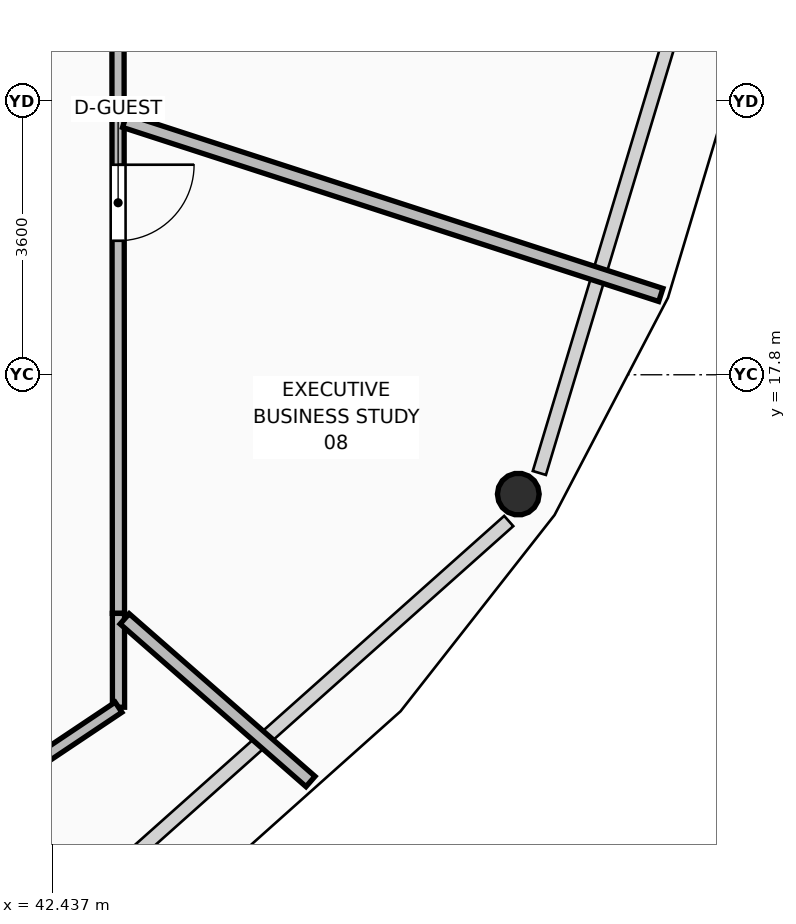
"""IFC4 building model, lengths in metres.
Left out: names, types, materials, properties, quantities, classifications, styles, units other than length and angle.
Written with IfcOpenShell. Run it as: python <this file> out.ifc"""

import sys

from ifc_helpers import new_model, si_unit, direction, frame, frame_2d, origin, origin_2d, place, context, subcontext, project, spatial, rectangle, hollow_circle, extrude, element, fill, save


model = new_model("IFC4")
c1 = context("Model", 3, precision=1e-05, world=origin(), true_north=direction((0.0, 1.0)))
c2 = subcontext(c1, "Body", "Model", "MODEL_VIEW")
j1 = project(units=[si_unit("LENGTHUNIT", "METRE"), si_unit("PLANEANGLEUNIT", "RADIAN")], contexts=[c1])
p1 = place(None, origin())
s1 = spatial("IfcSite", under=j1, at=p1, CompositionType="ELEMENT")
p2 = place(p1, origin())
s2 = spatial("IfcBuilding", under=s1, at=p2, CompositionType="ELEMENT")
p3 = place(p2, frame((0.0, 0.0, 271.35)))
s3 = spatial("IfcBuildingStorey", under=s2, at=p3, CompositionType="ELEMENT", Elevation=271.35)
p4 = place(p3, frame((48.569, 16.23, 0.0), z_axis=(-0.019349782702, 0.010119320989, 0.9997615642), x_axis=(-0.463421877407, -0.886137779096, 0.0)))
e1 = element("IfcColumn", 1, at=p4, inside=s3, PredefinedType="COLUMN", context=c2, shape_type="SweptSolid", body=[
    extrude(hollow_circle(Radius=0.275, WallThickness=0.025, at=origin_2d()), origin(), (0.0, 0.0, 1.0), 3.571),
])
p5 = place(p3, frame((43.299, 26.886, 0.0), z_axis=(0.0, 0.0, 1.0), x_axis=(0.000683147443, -0.999999766655, 0.0)))
e2 = element("IfcWall", 2, at=p5, inside=s3, PredefinedType="PARTITIONING", context=c2, shape_type="SweptSolid", body=[
    extrude(rectangle(XDim=5.718, YDim=0.16, at=frame_2d((2.859, 0.0))), origin(), (0.0, 0.0, 1.0), 3.132),
])
p6 = place(p5, frame((2.259, 0.0, 0.0)))
e3 = element("IfcOpeningElement", 3, at=p6, cuts=e2, PredefinedType="OPENING", context=c2, shape_type="SweptSolid", body=[
    extrude(rectangle(XDim=1.2, YDim=2.1, at=frame_2d((0.6, 1.05))), frame((0.0, 0.09, 0.0), z_axis=(0.0, -1.0, 0.0), x_axis=(1.0, 0.0, 0.0)), (0.0, 0.0, 1.0), 0.18),
])
p7 = place(p3, frame((43.303, 21.168, 0.0), z_axis=(0.0, 0.0, 1.0), x_axis=(0.000787903556, -0.999999689604, 0.0)))
e4 = element("IfcWall", 4, at=p7, inside=s3, PredefinedType="PARTITIONING", context=c2, shape_type="SweptSolid", body=[
    extrude(rectangle(XDim=6.507, YDim=0.16, at=frame_2d((3.253, 0.0))), origin(), (0.0, 0.0, 1.0), 3.132),
])
p8 = place(p7, frame((0.605, 0.0, 0.0)))
e5 = element("IfcOpeningElement", 5, at=p8, cuts=e4, PredefinedType="OPENING", context=c2, shape_type="SweptSolid", body=[
    extrude(rectangle(XDim=1.0, YDim=2.1, at=frame_2d((0.5, 1.05))), frame((0.0, 0.09, 0.0), z_axis=(0.0, -1.0, 0.0), x_axis=(1.0, 0.0, 0.0)), (0.0, 0.0, 1.0), 0.18),
])
p9 = place(p3, frame((43.308, 14.661, 0.0), z_axis=(0.0, 0.0, 1.0), x_axis=(0.000790826166, -0.999999687297, 0.0)))
e6 = element("IfcWall", 6, at=p9, inside=s3, PredefinedType="PARTITIONING", context=c2, shape_type="SweptSolid", body=[
    extrude(rectangle(XDim=1.235, YDim=0.16, at=frame_2d((0.617, 0.0))), origin(), (0.0, 0.0, 1.0), 3.55),
])
p10 = place(p3, frame((43.309, 13.426, 0.0), z_axis=(0.0, 0.0, 1.0), x_axis=(-0.831179139827, -0.556004709977, 0.0)))
e7 = element("IfcWall", 7, at=p10, inside=s3, PredefinedType="PARTITIONING", context=c2, shape_type="SweptSolid", body=[
    extrude(rectangle(XDim=2.115, YDim=0.16, at=frame_2d((1.058, 0.0))), origin(), (0.0, 0.0, 1.0), 3.55),
])
p11 = place(p3, frame((43.39, 14.589, 0.0), z_axis=(0.0, 0.0, 1.0), x_axis=(0.752469635062, -0.658626941683, 0.0)))
e8 = element("IfcWall", 8, at=p11, inside=s3, PredefinedType="PARTITIONING", context=c2, shape_type="SweptSolid", body=[
    extrude(rectangle(XDim=3.25, YDim=0.18, at=frame_2d((1.625, 0.0))), origin(), (0.0, 0.0, 1.0), 3.003),
])
p12 = place(p3, frame((43.39, 21.14, 0.0), z_axis=(0.0, 0.0, 1.0), x_axis=(0.951145769264, -0.308742166883, 0.0)))
e9 = element("IfcWall", 9, at=p12, inside=s3, PredefinedType="PARTITIONING", context=c2, shape_type="SweptSolid", body=[
    extrude(rectangle(XDim=7.417, YDim=0.18, at=frame_2d((3.708, 0.0))), origin(), (0.0, 0.0, 1.0), 3.003),
])
p13 = place(p8, origin())
e10 = element("IfcDoor", 10, at=p13, inside=s3, OperationType="SINGLE_SWING_LEFT", PredefinedType="DOOR", context=c2, shape_type="SweptSolid", body=[
    extrude(rectangle(XDim=1.0, YDim=2.1, at=frame_2d((0.5, 1.05))), frame((0.0, 0.025, 0.0), z_axis=(0.0, -1.0, 0.0), x_axis=(1.0, 0.0, 0.0)), (0.0, 0.0, 1.0), 0.05),
])
fill(e5, e10)
save(model, sys.argv[1])
